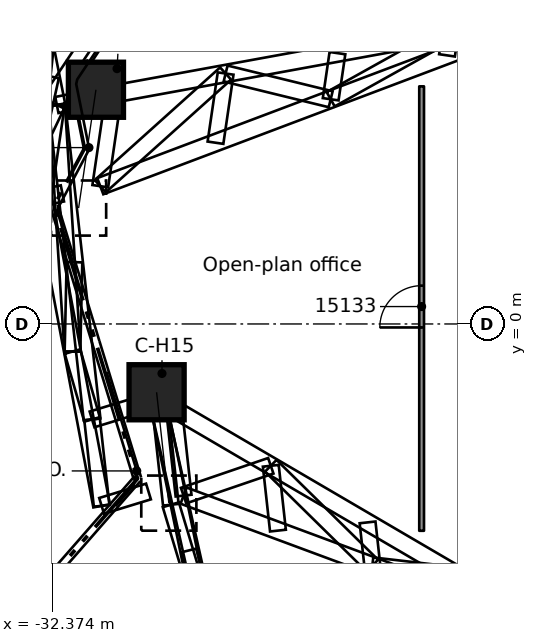
"""IFC4 building model, lengths in metres.
Left out: names, types, materials, properties, quantities, classifications, styles, units other than length and angle.
Written with IfcOpenShell. Run it as: python <this file> out.ifc"""

import sys

from ifc_helpers import new_model, si_unit, direction, frame, frame_2d, origin, origin_2d, place, context, subcontext, project, spatial, rectangle, extrude, element, fill, save


model = new_model("IFC4")
c1 = context("Model", 3, precision=1e-05, world=origin(), true_north=direction((0.0, 1.0)))
c2 = subcontext(c1, "Body", "Model", "MODEL_VIEW")
j1 = project(units=[si_unit("LENGTHUNIT", "METRE"), si_unit("PLANEANGLEUNIT", "RADIAN")], contexts=[c1])
p1 = place(None, origin())
s1 = spatial("IfcSite", under=j1, at=p1, CompositionType="ELEMENT")
p2 = place(p1, origin())
s2 = spatial("IfcBuilding", under=s1, at=p2, CompositionType="ELEMENT")
p3 = place(p2, frame((0.0, 0.0, 76.3)))
s3 = spatial("IfcBuildingStorey", under=s2, at=p3, CompositionType="ELEMENT", Elevation=76.3)
p4 = place(p3, frame((-29.624, -1.797, 0.469), z_axis=(0.070948481985, -0.642678137038, 0.762844102735), x_axis=(0.993961604032, 0.1097284362, 0.0)))
e1 = element("IfcColumn", 1, at=p4, inside=s3, PredefinedType="COLUMN", context=c2, shape_type="SweptSolid", body=[
    extrude(rectangle(XDim=1.45, YDim=1.45, at=origin_2d()), origin(), (0.0, 0.0, 1.0), 4.539),
])
p5 = place(p3, frame((-31.22, 6.163, 0.491), z_axis=(-0.098169402539, -0.670106023434, 0.735744986909), x_axis=(0.989438817347, -0.144951118407, 0.0)))
e2 = element("IfcColumn", 2, at=p5, inside=s3, PredefinedType="COLUMN", context=c2, shape_type="SweptSolid", body=[
    extrude(rectangle(XDim=1.45, YDim=1.45, at=origin_2d()), origin(), (0.0, 0.0, 1.0), 4.646),
])
p6 = place(p3, frame((-22.65, -5.442, 0.0), z_axis=(0.0, 0.0, 1.0), x_axis=(0.0, 1.0, 0.0)))
e3 = element("IfcWall", 3, at=p6, inside=s3, PredefinedType="PARTITIONING", context=c2, shape_type="SweptSolid", body=[
    extrude(rectangle(XDim=11.694, YDim=0.125, at=frame_2d((5.847, 0.0))), origin(), (0.0, 0.0, 1.0), 3.98),
])
p7 = place(p6, frame((5.35, 0.0, 0.0)))
e4 = element("IfcOpeningElement", 4, at=p7, cuts=e3, PredefinedType="OPENING", context=c2, shape_type="SweptSolid", body=[
    extrude(rectangle(XDim=1.1, YDim=2.1, at=frame_2d((0.55, 1.05))), frame((0.0, 0.073, 0.0), z_axis=(0.0, -1.0, 0.0), x_axis=(1.0, 0.0, 0.0)), (0.0, 0.0, 1.0), 0.145),
])
p8 = place(p7, origin())
e5 = element("IfcDoor", 5, at=p8, inside=s3, OperationType="SINGLE_SWING_RIGHT", PredefinedType="DOOR", context=c2, shape_type="SweptSolid", body=[
    extrude(rectangle(XDim=1.1, YDim=2.1, at=frame_2d((0.55, 1.05))), frame((0.0, 0.025, 0.0), z_axis=(0.0, -1.0, 0.0), x_axis=(1.0, 0.0, 0.0)), (0.0, 0.0, 1.0), 0.05),
])
fill(e4, e5)
save(model, sys.argv[1])
